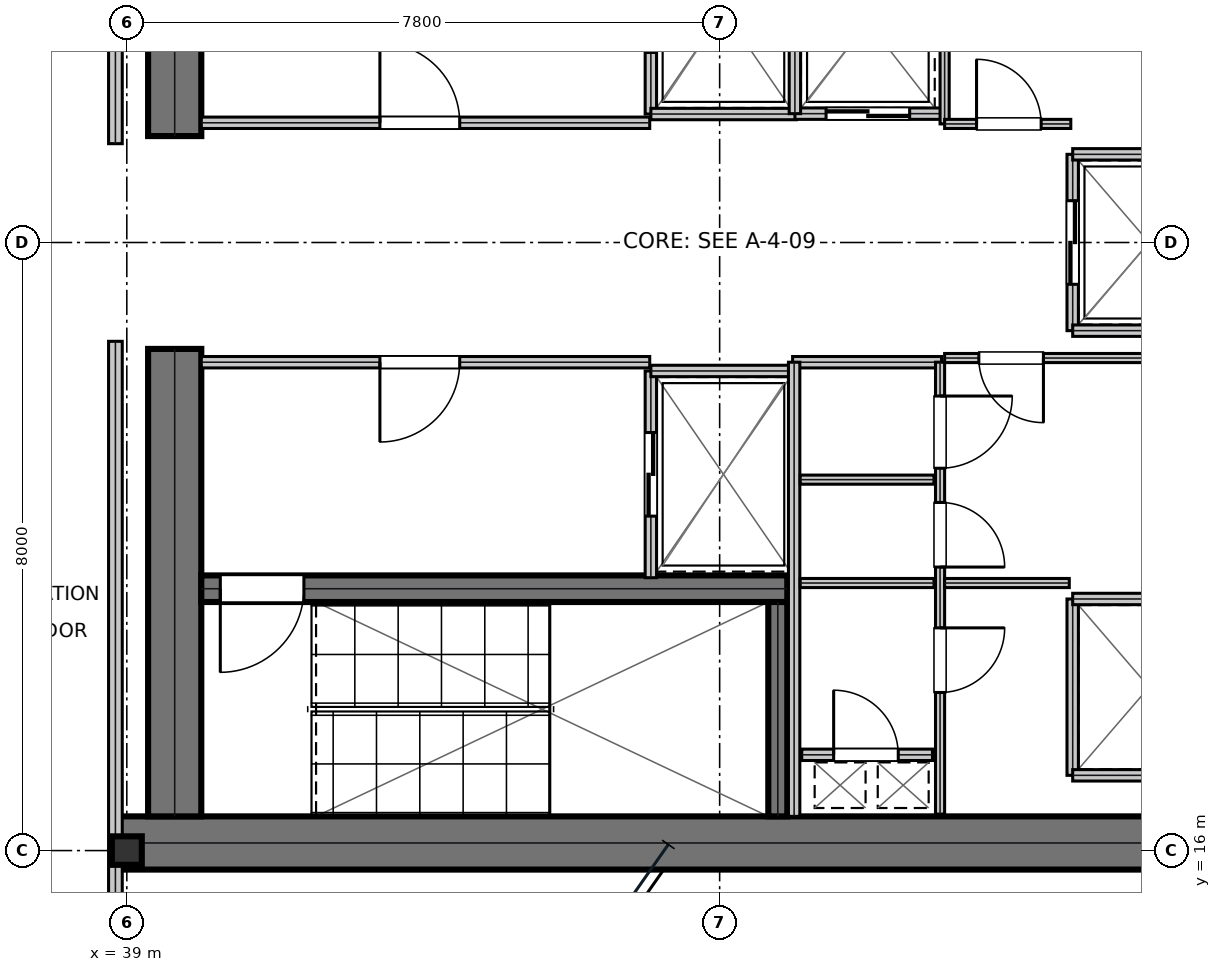
"""IFC4 building model, lengths in metres.
Left out: names, types, materials, properties, quantities, classifications, styles, units other than length and angle.
Written with IfcOpenShell. Run it as: python <this file> out.ifc"""

import sys

from ifc_helpers import new_model, si_unit, direction, frame, frame_2d, origin, origin_2d, place, context, subcontext, project, spatial, rectangle, i_section, extrude, element, fill, save


model = new_model("IFC4")
c1 = context("Model", 3, precision=1e-05, world=origin(), true_north=direction((0.0, 1.0)))
c2 = subcontext(c1, "Body", "Model", "MODEL_VIEW")
j1 = project(units=[si_unit("LENGTHUNIT", "METRE"), si_unit("PLANEANGLEUNIT", "RADIAN")], contexts=[c1])
p1 = place(None, origin())
s1 = spatial("IfcSite", under=j1, at=p1, CompositionType="ELEMENT")
p2 = place(p1, origin())
s2 = spatial("IfcBuilding", under=s1, at=p2, CompositionType="ELEMENT")
p3 = place(p2, frame((0.0, 0.0, 216.15)))
s3 = spatial("IfcBuildingStorey", under=s2, at=p3, CompositionType="ELEMENT", Elevation=216.15)
p4 = place(p3, frame((38.8, 16.1, 0.0), z_axis=(0.0, 0.0, 1.0), x_axis=(1.0, 0.0, 0.0)))
e1 = element("IfcWall", 1, at=p4, inside=s3, PredefinedType="SHEAR", context=c2, shape_type="SweptSolid", body=[
    extrude(rectangle(XDim=16.0, YDim=0.7, at=frame_2d((8.0, 0.0))), origin(), (0.0, 0.0, 1.0), 3.79),
])
for number, where, z_axis, x_axis in (
    (2, (39.63, 16.45, 0.0), (0.0, 0.0, 1.0), (0.0, 1.0, 0.0)),
    (3, (39.63, 25.4, 0.0), (0.0, 0.0, 1.0), (0.0, 1.0, 0.0)),
):
    element("IfcWall", number, at=place(p3, frame(where, z_axis=z_axis, x_axis=x_axis)), inside=s3, PredefinedType="SHEAR", context=c2, shape_type="SweptSolid", body=[
        extrude(rectangle(XDim=6.15, YDim=0.7, at=frame_2d((3.075, 0.0))), origin(), (0.0, 0.0, 1.0), 3.79),
    ])
p5 = place(p3, frame((39.98, 19.445, 0.0), z_axis=(0.0, 0.0, 1.0), x_axis=(1.0, 0.0, 0.0)))
e4 = element("IfcWall", 4, at=p5, inside=s3, PredefinedType="SHEAR", context=c2, shape_type="SweptSolid", body=[
    extrude(rectangle(XDim=7.71, YDim=0.35, at=frame_2d((3.855, 0.0))), origin(), (0.0, 0.0, 1.0), 3.79),
])
p6 = place(p5, frame((0.25, 0.0, 0.0)))
e5 = element("IfcOpeningElement", 5, at=p6, cuts=e4, PredefinedType="OPENING", context=c2, shape_type="SweptSolid", body=[
    extrude(rectangle(XDim=1.1, YDim=2.15, at=frame_2d((0.55, 1.075))), frame((0.0, 0.185, 0.0), z_axis=(0.0, -1.0, 0.0), x_axis=(1.0, 0.0, 0.0)), (0.0, 0.0, 1.0), 0.37),
])
p7 = place(p3, frame((47.565, 16.45, 0.0), z_axis=(0.0, 0.0, 1.0), x_axis=(0.0, 1.0, 0.0)))
e6 = element("IfcWall", 6, at=p7, inside=s3, PredefinedType="SHEAR", context=c2, shape_type="SweptSolid", body=[
    extrude(rectangle(XDim=2.82, YDim=0.25, at=frame_2d((1.41, 0.0))), origin(), (0.0, 0.0, 1.0), 3.79),
])
p8 = place(p3, frame((39.0, 16.0, 0.0), z_axis=(0.0, 0.0, 1.0), x_axis=(1.0, 0.0, 0.0)))
e7 = element("IfcColumn", 7, at=p8, inside=s3, PredefinedType="COLUMN", context=c2, shape_type="SweptSolid", body=[
    extrude(i_section(OverallWidth=0.394, OverallDepth=0.375, WebThickness=0.017, FlangeThickness=0.028, at=origin_2d()), origin(), (0.0, 0.0, 1.0), 4.044),
])
p9 = place(p3, frame((39.98, 25.575, 0.0), z_axis=(0.0, 0.0, 1.0), x_axis=(1.0, 0.0, 0.0)))
e8 = element("IfcWall", 8, at=p9, inside=s3, PredefinedType="PARTITIONING", context=c2, shape_type="SweptSolid", body=[
    extrude(rectangle(XDim=5.9, YDim=0.15, at=frame_2d((2.95, 0.0))), origin(), (0.0, 0.0, 1.0), 3.79),
])
p10 = place(p9, frame((2.35, 0.0, 0.0)))
e9 = element("IfcOpeningElement", 9, at=p10, cuts=e8, PredefinedType="OPENING", context=c2, shape_type="SweptSolid", body=[
    extrude(rectangle(XDim=1.05, YDim=2.15, at=frame_2d((0.525, 1.075))), frame((0.0, 0.085, 0.0), z_axis=(0.0, -1.0, 0.0), x_axis=(1.0, 0.0, 0.0)), (0.0, 0.0, 1.0), 0.17),
])
p11 = place(p3, frame((39.98, 22.425, 0.0), z_axis=(0.0, 0.0, 1.0), x_axis=(1.0, 0.0, 0.0)))
e10 = element("IfcWall", 10, at=p11, inside=s3, PredefinedType="PARTITIONING", context=c2, shape_type="SweptSolid", body=[
    extrude(rectangle(XDim=5.9, YDim=0.15, at=frame_2d((2.95, 0.0))), origin(), (0.0, 0.0, 1.0), 3.79),
])
p12 = place(p11, frame((2.35, 0.0, 0.0)))
e11 = element("IfcOpeningElement", 11, at=p12, cuts=e10, PredefinedType="OPENING", context=c2, shape_type="SweptSolid", body=[
    extrude(rectangle(XDim=1.05, YDim=2.15, at=frame_2d((0.525, 1.075))), frame((0.0, 0.085, 0.0), z_axis=(0.0, -1.0, 0.0), x_axis=(1.0, 0.0, 0.0)), (0.0, 0.0, 1.0), 0.17),
])
p13 = place(p3, frame((45.895, 25.69, 0.0), z_axis=(0.0, 0.0, 1.0), x_axis=(0.0, 1.0, 0.0)))
e12 = element("IfcWall", 12, at=p13, inside=s3, PredefinedType="PARTITIONING", context=c2, shape_type="SweptSolid", body=[
    extrude(rectangle(XDim=2.72, YDim=0.15, at=frame_2d((1.36, 0.0))), origin(), (0.0, 0.0, 1.0), 3.79),
])
p14 = place(p13, frame((0.81, 0.0, 0.0)))
e13 = element("IfcOpeningElement", 13, at=p14, cuts=e12, PredefinedType="OPENING", context=c2, shape_type="SweptSolid", body=[
    extrude(rectangle(XDim=1.1, YDim=2.15, at=frame_2d((0.55, 1.075))), frame((0.0, 0.085, 0.0), z_axis=(0.0, -1.0, 0.0), x_axis=(1.0, 0.0, 0.0)), (0.0, 0.0, 1.0), 0.17),
])
p15 = place(p3, frame((45.895, 25.69, 0.0), z_axis=(0.0, 0.0, 1.0), x_axis=(1.0, 0.0, 0.0)))
e14 = element("IfcWall", 14, at=p15, inside=s3, PredefinedType="PARTITIONING", context=c2, shape_type="SweptSolid", body=[
    extrude(rectangle(XDim=1.915, YDim=0.15, at=frame_2d((0.958, 0.0))), origin(), (0.0, 0.0, 1.0), 3.79),
])
p16 = place(p3, frame((45.895, 19.59, 0.0), z_axis=(0.0, 0.0, 1.0), x_axis=(0.0, 1.0, 0.0)))
e15 = element("IfcWall", 15, at=p16, inside=s3, PredefinedType="PARTITIONING", context=c2, shape_type="SweptSolid", body=[
    extrude(rectangle(XDim=2.72, YDim=0.15, at=frame_2d((1.36, 0.0))), origin(), (0.0, 0.0, 1.0), 3.79),
])
p17 = place(p16, frame((0.81, 0.0, 0.0)))
e16 = element("IfcOpeningElement", 16, at=p17, cuts=e15, PredefinedType="OPENING", context=c2, shape_type="SweptSolid", body=[
    extrude(rectangle(XDim=1.1, YDim=2.15, at=frame_2d((0.55, 1.075))), frame((0.0, 0.085, 0.0), z_axis=(0.0, -1.0, 0.0), x_axis=(1.0, 0.0, 0.0)), (0.0, 0.0, 1.0), 0.17),
])
p18 = place(p3, frame((45.895, 22.31, 0.0), z_axis=(0.0, 0.0, 1.0), x_axis=(1.0, 0.0, 0.0)))
e17 = element("IfcWall", 17, at=p18, inside=s3, PredefinedType="PARTITIONING", context=c2, shape_type="SweptSolid", body=[
    extrude(rectangle(XDim=1.915, YDim=0.15, at=frame_2d((0.958, 0.0))), origin(), (0.0, 0.0, 1.0), 3.79),
])
p19 = place(p3, frame((47.79, 25.695, 0.0), z_axis=(0.0, 0.0, 1.0), x_axis=(1.0, 0.0, 0.0)))
e18 = element("IfcWall", 18, at=p19, inside=s3, PredefinedType="PARTITIONING", context=c2, shape_type="SweptSolid", body=[
    extrude(rectangle(XDim=1.92, YDim=0.15, at=frame_2d((0.96, 0.0))), origin(), (0.0, 0.0, 1.0), 3.79),
])
p20 = place(p19, frame((0.41, 0.0, 0.0)))
e19 = element("IfcOpeningElement", 19, at=p20, cuts=e18, PredefinedType="OPENING", context=c2, shape_type="SweptSolid", body=[
    extrude(rectangle(XDim=1.1, YDim=2.15, at=frame_2d((0.55, 1.075))), frame((0.0, 0.085, 0.0), z_axis=(0.0, -1.0, 0.0), x_axis=(1.0, 0.0, 0.0)), (0.0, 0.0, 1.0), 0.17),
])
p21 = place(p3, frame((47.79, 25.695, 0.0), z_axis=(0.0, 0.0, 1.0), x_axis=(0.0, 1.0, 0.0)))
e20 = element("IfcWall", 20, at=p21, inside=s3, PredefinedType="PARTITIONING", context=c2, shape_type="SweptSolid", body=[
    extrude(rectangle(XDim=2.415, YDim=0.15, at=frame_2d((1.208, 0.0))), origin(), (0.0, 0.0, 1.0), 3.79),
])
p22 = place(p3, frame((51.445, 22.84, 0.0), z_axis=(0.0, 0.0, 1.0), x_axis=(0.0, 1.0, 0.0)))
e21 = element("IfcWall", 21, at=p22, inside=s3, PredefinedType="PARTITIONING", context=c2, shape_type="SweptSolid", body=[
    extrude(rectangle(XDim=2.32, YDim=0.15, at=frame_2d((1.16, 0.0))), origin(), (0.0, 0.0, 1.0), 3.79),
])
p23 = place(p22, frame((0.61, 0.0, 0.0)))
e22 = element("IfcOpeningElement", 22, at=p23, cuts=e21, PredefinedType="OPENING", context=c2, shape_type="SweptSolid", body=[
    extrude(rectangle(XDim=1.1, YDim=2.15, at=frame_2d((0.55, 1.075))), frame((0.0, 0.085, 0.0), z_axis=(0.0, -1.0, 0.0), x_axis=(1.0, 0.0, 0.0)), (0.0, 0.0, 1.0), 0.17),
])
for number, where, z_axis, x_axis in (
    (23, (51.445, 22.84, 0.0), (0.0, 0.0, 1.0), (1.0, 0.0, 0.0)),
    (24, (51.445, 25.16, 0.0), (0.0, 0.0, 1.0), (1.0, 0.0, 0.0)),
):
    element("IfcWall", number, at=place(p3, frame(where, z_axis=z_axis, x_axis=x_axis)), inside=s3, PredefinedType="PARTITIONING", context=c2, shape_type="SweptSolid", body=[
        extrude(rectangle(XDim=2.015, YDim=0.15, at=frame_2d((1.007, 0.0))), origin(), (0.0, 0.0, 1.0), 3.79),
    ])
p24 = place(p3, frame((51.445, 16.99, 0.0), z_axis=(0.0, 0.0, 1.0), x_axis=(0.0, 1.0, 0.0)))
e25 = element("IfcWall", 25, at=p24, inside=s3, PredefinedType="PARTITIONING", context=c2, shape_type="SweptSolid", body=[
    extrude(rectangle(XDim=2.32, YDim=0.15, at=frame_2d((1.16, 0.0))), origin(), (0.0, 0.0, 1.0), 3.79),
])
for number, where, z_axis, x_axis in (
    (26, (51.445, 16.99, 0.0), (0.0, 0.0, 1.0), (1.0, 0.0, 0.0)),
    (27, (51.445, 19.31, 0.0), (0.0, 0.0, 1.0), (1.0, 0.0, 0.0)),
):
    element("IfcWall", number, at=place(p3, frame(where, z_axis=z_axis, x_axis=x_axis)), inside=s3, PredefinedType="PARTITIONING", context=c2, shape_type="SweptSolid", body=[
        extrude(rectangle(XDim=2.015, YDim=0.15, at=frame_2d((1.007, 0.0))), origin(), (0.0, 0.0, 1.0), 3.79),
    ])
p25 = place(p3, frame((47.88, 17.26, 0.0), z_axis=(0.0, 0.0, 1.0), x_axis=(1.0, 0.0, 0.0)))
e28 = element("IfcWall", 28, at=p25, inside=s3, PredefinedType="PARTITIONING", context=c2, shape_type="SweptSolid", body=[
    extrude(rectangle(XDim=1.72, YDim=0.15, at=frame_2d((0.86, 0.0))), origin(), (0.0, 0.0, 1.0), 3.79),
])
p26 = place(p25, frame((0.42, 0.0, 0.0)))
e29 = element("IfcOpeningElement", 29, at=p26, cuts=e28, PredefinedType="OPENING", context=c2, shape_type="SweptSolid", body=[
    extrude(rectangle(XDim=0.85, YDim=2.15, at=frame_2d((0.425, 1.075))), frame((0.0, 0.085, 0.0), z_axis=(0.0, -1.0, 0.0), x_axis=(1.0, 0.0, 0.0)), (0.0, 0.0, 1.0), 0.17),
])
p27 = place(p3, frame((47.76, 22.425, 0.0), z_axis=(0.0, 0.0, 1.0), x_axis=(1.0, 0.0, 0.0)))
e30 = element("IfcWall", 30, at=p27, inside=s3, PredefinedType="PARTITIONING", context=c2, shape_type="SweptSolid", body=[
    extrude(rectangle(XDim=1.96, YDim=0.15, at=frame_2d((0.98, 0.0))), origin(), (0.0, 0.0, 1.0), 3.79),
])
p28 = place(p3, frame((47.78, 16.45, 0.0), z_axis=(0.0, 0.0, 1.0), x_axis=(0.0, 1.0, 0.0)))
e31 = element("IfcWall", 31, at=p28, inside=s3, PredefinedType="PARTITIONING", context=c2, shape_type="SweptSolid", body=[
    extrude(rectangle(XDim=5.975, YDim=0.15, at=frame_2d((2.988, 0.0))), origin(), (0.0, 0.0, 1.0), 3.79),
])
for number, where, z_axis, x_axis in (
    (32, (47.86, 19.52, 0.0), (0.0, 0.0, 1.0), (1.0, 0.0, 0.0)),
    (33, (47.86, 20.88, 0.0), (0.0, 0.0, 1.0), (1.0, 0.0, 0.0)),
):
    element("IfcWall", number, at=place(p3, frame(where, z_axis=z_axis, x_axis=x_axis)), inside=s3, PredefinedType="PARTITIONING", context=c2, shape_type="SweptSolid", body=[
        extrude(rectangle(XDim=1.76, YDim=0.12, at=frame_2d((0.88, 0.0))), origin(), (0.0, 0.0, 1.0), 3.79),
    ])
p29 = place(p3, frame((49.7, 16.48, 0.0), z_axis=(0.0, 0.0, 1.0), x_axis=(0.0, 1.0, 0.0)))
e34 = element("IfcWall", 34, at=p29, inside=s3, PredefinedType="PARTITIONING", context=c2, shape_type="SweptSolid", body=[
    extrude(rectangle(XDim=5.945, YDim=0.12, at=frame_2d((2.973, 0.0))), origin(), (0.0, 0.0, 1.0), 3.79),
])
p30 = place(p29, frame((1.6, 0.0, 0.0)))
e35 = element("IfcOpeningElement", 35, at=p30, cuts=e34, PredefinedType="OPENING", context=c2, shape_type="SweptSolid", body=[
    extrude(rectangle(XDim=0.85, YDim=2.15, at=frame_2d((0.425, 1.075))), frame((0.0, 0.07, 0.0), z_axis=(0.0, -1.0, 0.0), x_axis=(1.0, 0.0, 0.0)), (0.0, 0.0, 1.0), 0.14),
])
p31 = place(p29, frame((3.25, 0.0, 0.0)))
e36 = element("IfcOpeningElement", 36, at=p31, cuts=e34, PredefinedType="OPENING", context=c2, shape_type="SweptSolid", body=[
    extrude(rectangle(XDim=0.85, YDim=2.15, at=frame_2d((0.425, 1.075))), frame((0.0, 0.07, 0.0), z_axis=(0.0, -1.0, 0.0), x_axis=(1.0, 0.0, 0.0)), (0.0, 0.0, 1.0), 0.14),
])
p32 = place(p29, frame((4.55, 0.0, 0.0)))
e37 = element("IfcOpeningElement", 37, at=p32, cuts=e34, PredefinedType="OPENING", context=c2, shape_type="SweptSolid", body=[
    extrude(rectangle(XDim=0.95, YDim=2.15, at=frame_2d((0.475, 1.075))), frame((0.0, 0.07, 0.0), z_axis=(0.0, -1.0, 0.0), x_axis=(1.0, 0.0, 0.0)), (0.0, 0.0, 1.0), 0.14),
])
p33 = place(p3, frame((49.76, 22.48, 0.0), z_axis=(0.0, 0.0, 1.0), x_axis=(1.0, 0.0, 0.0)))
e38 = element("IfcWall", 38, at=p33, inside=s3, PredefinedType="PARTITIONING", context=c2, shape_type="SweptSolid", body=[
    extrude(rectangle(XDim=3.9, YDim=0.12, at=frame_2d((1.95, 0.0))), origin(), (0.0, 0.0, 1.0), 3.79),
])
p34 = place(p33, frame((0.45, 0.0, 0.0)))
e39 = element("IfcOpeningElement", 39, at=p34, cuts=e38, PredefinedType="OPENING", context=c2, shape_type="SweptSolid", body=[
    extrude(rectangle(XDim=0.85, YDim=2.15, at=frame_2d((0.425, 1.075))), frame((0.0, 0.07, 0.0), z_axis=(0.0, -1.0, 0.0), x_axis=(1.0, 0.0, 0.0)), (0.0, 0.0, 1.0), 0.14),
])
p35 = place(p3, frame((49.76, 19.52, 0.0), z_axis=(0.0, 0.0, 1.0), x_axis=(1.0, 0.0, 0.0)))
e40 = element("IfcWall", 40, at=p35, inside=s3, PredefinedType="PARTITIONING", context=c2, shape_type="SweptSolid", body=[
    extrude(rectangle(XDim=1.64, YDim=0.12, at=frame_2d((0.82, 0.0))), origin(), (0.0, 0.0, 1.0), 3.79),
])
p36 = place(p3, frame((49.76, 25.56, 0.0), z_axis=(0.0, 0.0, 1.0), x_axis=(0.0, 1.0, 0.0)))
e41 = element("IfcWall", 41, at=p36, inside=s3, PredefinedType="PARTITIONING", context=c2, shape_type="SweptSolid", body=[
    extrude(rectangle(XDim=2.66, YDim=0.12, at=frame_2d((1.33, 0.0))), origin(), (0.0, 0.0, 1.0), 3.79),
])
p37 = place(p3, frame((49.76, 25.56, 0.0), z_axis=(0.0, 0.0, 1.0), x_axis=(1.0, 0.0, 0.0)))
e42 = element("IfcWall", 42, at=p37, inside=s3, PredefinedType="PARTITIONING", context=c2, shape_type="SweptSolid", body=[
    extrude(rectangle(XDim=1.66, YDim=0.12, at=frame_2d((0.83, 0.0))), origin(), (0.0, 0.0, 1.0), 3.79),
])
p38 = place(p37, frame((0.42, 0.0, 0.0)))
e43 = element("IfcOpeningElement", 43, at=p38, cuts=e42, PredefinedType="OPENING", context=c2, shape_type="SweptSolid", body=[
    extrude(rectangle(XDim=0.85, YDim=2.15, at=frame_2d((0.425, 1.075))), frame((0.0, 0.07, 0.0), z_axis=(0.0, -1.0, 0.0), x_axis=(1.0, 0.0, 0.0)), (0.0, 0.0, 1.0), 0.14),
])
p39 = place(p3, frame((38.85, 14.707, 0.0), z_axis=(0.0, 0.0, 1.0), x_axis=(0.0, 1.0, 0.0)))
e44 = element("IfcWall", 44, at=p39, inside=s3, PredefinedType="SOLIDWALL", context=c2, shape_type="SweptSolid", body=[
    extrude(rectangle(XDim=7.993, YDim=0.18, at=frame_2d((3.997, 0.0))), origin(), (0.0, 0.0, 1.0), 3.241),
])
p40 = place(p3, frame((38.85, 25.3, 0.0), z_axis=(0.0, 0.0, 1.0), x_axis=(0.0, 1.0, 0.0)))
e45 = element("IfcWall", 45, at=p40, inside=s3, PredefinedType="SOLIDWALL", context=c2, shape_type="SweptSolid", body=[
    extrude(rectangle(XDim=8.2, YDim=0.18, at=frame_2d((4.1, 0.0))), origin(), (0.0, 0.0, 1.0), 3.241),
])
p41 = place(p10, origin())
e46 = element("IfcDoor", 46, at=p41, inside=s3, OperationType="SINGLE_SWING_LEFT", PredefinedType="DOOR", context=c2, shape_type="SweptSolid", body=[
    extrude(rectangle(XDim=1.05, YDim=2.15, at=frame_2d((0.525, 1.075))), frame((0.0, 0.025, 0.0), z_axis=(0.0, -1.0, 0.0), x_axis=(1.0, 0.0, 0.0)), (0.0, 0.0, 1.0), 0.05),
])
fill(e9, e46)
p42 = place(p12, frame((1.05, 0.0, 0.0), z_axis=(0.0, 0.0, 1.0), x_axis=(-1.0, 0.0, 0.0)))
e47 = element("IfcDoor", 47, at=p42, inside=s3, OperationType="SINGLE_SWING_RIGHT", PredefinedType="DOOR", context=c2, shape_type="SweptSolid", body=[
    extrude(rectangle(XDim=1.05, YDim=2.15, at=frame_2d((0.525, 1.075))), frame((0.0, 0.025, 0.0), z_axis=(0.0, -1.0, 0.0), x_axis=(1.0, 0.0, 0.0)), (0.0, 0.0, 1.0), 0.05),
])
fill(e11, e47)
p43 = place(p17, frame((1.1, 0.0, 0.0), z_axis=(0.0, 0.0, 1.0), x_axis=(-1.0, 0.0, 0.0)))
e48 = element("IfcDoor", 48, at=p43, inside=s3, OperationType="DOUBLE_DOOR_SLIDING", PredefinedType="DOOR", context=c2, shape_type="SweptSolid", body=[
    extrude(rectangle(XDim=1.1, YDim=2.15, at=frame_2d((0.55, 1.075))), frame((0.0, 0.025, 0.0), z_axis=(0.0, -1.0, 0.0), x_axis=(1.0, 0.0, 0.0)), (0.0, 0.0, 1.0), 0.05),
])
fill(e16, e48)
p44 = place(p20, frame((1.1, 0.0, 0.0), z_axis=(0.0, 0.0, 1.0), x_axis=(-1.0, 0.0, 0.0)))
e49 = element("IfcDoor", 49, at=p44, inside=s3, OperationType="DOUBLE_DOOR_SLIDING", PredefinedType="DOOR", context=c2, shape_type="SweptSolid", body=[
    extrude(rectangle(XDim=1.1, YDim=2.15, at=frame_2d((0.55, 1.075))), frame((0.0, 0.025, 0.0), z_axis=(0.0, -1.0, 0.0), x_axis=(1.0, 0.0, 0.0)), (0.0, 0.0, 1.0), 0.05),
])
fill(e19, e49)
p45 = place(p23, frame((1.1, 0.0, 0.0), z_axis=(0.0, 0.0, 1.0), x_axis=(-1.0, 0.0, 0.0)))
e50 = element("IfcDoor", 50, at=p45, inside=s3, OperationType="DOUBLE_DOOR_SLIDING", PredefinedType="DOOR", context=c2, shape_type="SweptSolid", body=[
    extrude(rectangle(XDim=1.1, YDim=2.15, at=frame_2d((0.55, 1.075))), frame((0.0, 0.025, 0.0), z_axis=(0.0, -1.0, 0.0), x_axis=(1.0, 0.0, 0.0)), (0.0, 0.0, 1.0), 0.05),
])
fill(e22, e50)
p46 = place(p26, origin())
e51 = element("IfcDoor", 51, at=p46, inside=s3, OperationType="SINGLE_SWING_LEFT", PredefinedType="TRAPDOOR", context=c2, shape_type="SweptSolid", body=[
    extrude(rectangle(XDim=0.85, YDim=2.15, at=frame_2d((0.425, 1.075))), frame((0.0, 0.025, 0.0), z_axis=(0.0, -1.0, 0.0), x_axis=(1.0, 0.0, 0.0)), (0.0, 0.0, 1.0), 0.05),
])
fill(e29, e51)
p47 = place(p30, frame((0.85, 0.0, 0.0), z_axis=(0.0, 0.0, 1.0), x_axis=(-1.0, 0.0, 0.0)))
e52 = element("IfcDoor", 52, at=p47, inside=s3, OperationType="SINGLE_SWING_LEFT", PredefinedType="DOOR", context=c2, shape_type="SweptSolid", body=[
    extrude(rectangle(XDim=0.85, YDim=2.15, at=frame_2d((0.425, 1.075))), frame((0.0, 0.025, 0.0), z_axis=(0.0, -1.0, 0.0), x_axis=(1.0, 0.0, 0.0)), (0.0, 0.0, 1.0), 0.05),
])
fill(e35, e52)
p48 = place(p31, frame((0.85, 0.0, 0.0), z_axis=(0.0, 0.0, 1.0), x_axis=(-1.0, 0.0, 0.0)))
e53 = element("IfcDoor", 53, at=p48, inside=s3, OperationType="SINGLE_SWING_RIGHT", PredefinedType="DOOR", context=c2, shape_type="SweptSolid", body=[
    extrude(rectangle(XDim=0.85, YDim=2.15, at=frame_2d((0.425, 1.075))), frame((0.0, 0.025, 0.0), z_axis=(0.0, -1.0, 0.0), x_axis=(1.0, 0.0, 0.0)), (0.0, 0.0, 1.0), 0.05),
])
fill(e36, e53)
p49 = place(p32, frame((0.95, 0.0, 0.0), z_axis=(0.0, 0.0, 1.0), x_axis=(-1.0, 0.0, 0.0)))
e54 = element("IfcDoor", 54, at=p49, inside=s3, OperationType="SINGLE_SWING_LEFT", PredefinedType="DOOR", context=c2, shape_type="SweptSolid", body=[
    extrude(rectangle(XDim=0.95, YDim=2.15, at=frame_2d((0.475, 1.075))), frame((0.0, 0.025, 0.0), z_axis=(0.0, -1.0, 0.0), x_axis=(1.0, 0.0, 0.0)), (0.0, 0.0, 1.0), 0.05),
])
fill(e37, e54)
p50 = place(p34, frame((0.85, 0.0, 0.0), z_axis=(0.0, 0.0, 1.0), x_axis=(-1.0, 0.0, 0.0)))
e55 = element("IfcDoor", 55, at=p50, inside=s3, OperationType="SINGLE_SWING_LEFT", PredefinedType="DOOR", context=c2, shape_type="SweptSolid", body=[
    extrude(rectangle(XDim=0.85, YDim=2.15, at=frame_2d((0.425, 1.075))), frame((0.0, 0.025, 0.0), z_axis=(0.0, -1.0, 0.0), x_axis=(1.0, 0.0, 0.0)), (0.0, 0.0, 1.0), 0.05),
])
fill(e39, e55)
p51 = place(p38, origin())
e56 = element("IfcDoor", 56, at=p51, inside=s3, OperationType="SINGLE_SWING_LEFT", PredefinedType="DOOR", context=c2, shape_type="SweptSolid", body=[
    extrude(rectangle(XDim=0.85, YDim=2.15, at=frame_2d((0.425, 1.075))), frame((0.0, 0.025, 0.0), z_axis=(0.0, -1.0, 0.0), x_axis=(1.0, 0.0, 0.0)), (0.0, 0.0, 1.0), 0.05),
])
fill(e43, e56)
p52 = place(p6, frame((1.1, 0.0, 0.0), z_axis=(0.0, 0.0, 1.0), x_axis=(-1.0, 0.0, 0.0)))
e57 = element("IfcDoor", 57, at=p52, inside=s3, OperationType="SINGLE_SWING_RIGHT", PredefinedType="DOOR", context=c2, shape_type="SweptSolid", body=[
    extrude(rectangle(XDim=1.1, YDim=2.15, at=frame_2d((0.55, 1.075))), frame((0.0, 0.025, 0.0), z_axis=(0.0, -1.0, 0.0), x_axis=(1.0, 0.0, 0.0)), (0.0, 0.0, 1.0), 0.05),
])
fill(e5, e57)
save(model, sys.argv[1])
